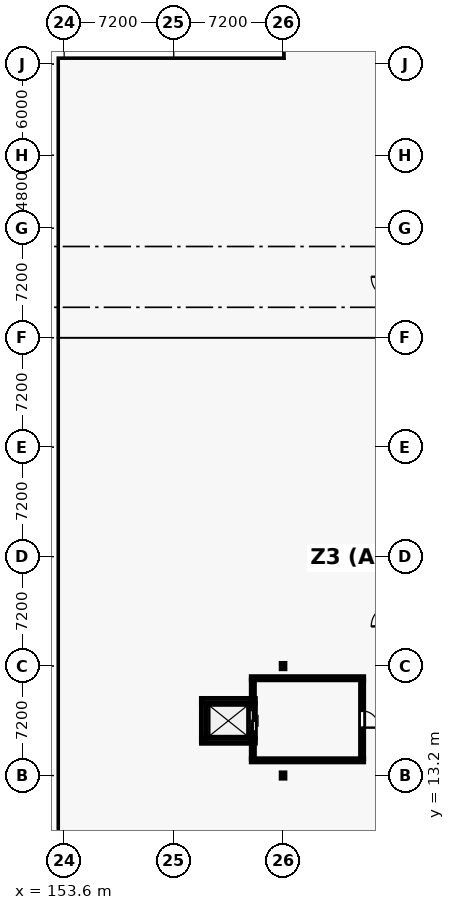
"""IFC4 building model, lengths in metres.
Left out: names, types, materials, properties, quantities, classifications, styles, units other than length and angle.
Written with IfcOpenShell. Run it as: python <this file> out.ifc"""

import sys

from ifc_helpers import new_model, si_unit, direction, frame, frame_2d, origin, origin_2d, place, context, subcontext, project, spatial, rectangle, i_section, extrude, element, fill, save


model = new_model("IFC4")
c1 = context("Model", 3, precision=1e-05, world=origin(), true_north=direction((0.0, 1.0)))
c2 = subcontext(c1, "Body", "Model", "MODEL_VIEW")
j1 = project(units=[si_unit("LENGTHUNIT", "METRE"), si_unit("PLANEANGLEUNIT", "RADIAN")], contexts=[c1])
p1 = place(None, origin())
s1 = spatial("IfcSite", under=j1, at=p1, CompositionType="ELEMENT")
p2 = place(p1, origin())
s2 = spatial("IfcBuilding", under=s1, at=p2, CompositionType="ELEMENT")
p3 = place(p2, frame((0.0, 0.0, 13.2)))
s3 = spatial("IfcBuildingStorey", under=s2, at=p3, CompositionType="ELEMENT", Elevation=13.2)
for number, where, z_axis, x_axis in (
    (1, (168.0, 13.2, 0.0), (0.0, 0.0, 1.0), (1.0, 0.0, 0.0)),
    (2, (168.0, 20.4, 0.0), (0.0, 0.0, 1.0), (1.0, 0.0, 0.0)),
):
    element("IfcColumn", number, at=place(p3, frame(where, z_axis=z_axis, x_axis=x_axis)), inside=s3, PredefinedType="COLUMN", context=c2, shape_type="SweptSolid", body=[
        extrude(i_section(OverallWidth=0.254, OverallDepth=0.356, WebThickness=0.01, FlangeThickness=0.018, FilletRadius=0.015, at=origin_2d()), origin(), (0.0, 0.0, 1.0), 3.66),
    ])
for number, where, z_axis, x_axis in (
    (3, (166.175, 15.488, 0.0), (0.0, 0.0, 1.0), (-1.0, 0.0, 0.0)),
    (4, (162.625, 18.112, 0.0), (0.0, 0.0, 1.0), (1.0, 0.0, 0.0)),
):
    element("IfcWall", number, at=place(p3, frame(where, z_axis=z_axis, x_axis=x_axis)), inside=s3, PredefinedType="SHEAR", context=c2, shape_type="SweptSolid", body=[
        extrude(rectangle(XDim=3.55, YDim=0.325, at=frame_2d((1.775, 0.0))), origin(), (0.0, 0.0, 1.0), 3.4),
    ])
p4 = place(p3, frame((162.788, 15.65, 0.0), z_axis=(0.0, 0.0, 1.0), x_axis=(0.0, 1.0, 0.0)))
e5 = element("IfcWall", 5, at=p4, inside=s3, PredefinedType="SHEAR", context=c2, shape_type="SweptSolid", body=[
    extrude(rectangle(XDim=2.3, YDim=0.325, at=frame_2d((1.15, 0.0))), origin(), (0.0, 0.0, 1.0), 3.4),
])
p5 = place(p3, frame((166.012, 17.95, 0.0), z_axis=(0.0, 0.0, 1.0), x_axis=(0.0, -1.0, 0.0)))
e6 = element("IfcWall", 6, at=p5, inside=s3, PredefinedType="SHEAR", context=c2, shape_type="SweptSolid", body=[
    extrude(rectangle(XDim=2.3, YDim=0.325, at=frame_2d((1.15, 0.0))), origin(), (0.0, 0.0, 1.0), 3.4),
])
p6 = place(p5, frame((0.45, 0.0, 0.0)))
e7 = element("IfcOpeningElement", 7, at=p6, cuts=e6, PredefinedType="OPENING", context=c2, shape_type="SweptSolid", body=[
    extrude(rectangle(XDim=1.4, YDim=2.3, at=frame_2d((0.7, 1.15))), frame((0.0, 0.172, 0.0), z_axis=(0.0, -1.0, 0.0), x_axis=(1.0, 0.0, 0.0)), (0.0, 0.0, 1.0), 0.345),
])
for number, where, z_axis, x_axis in (
    (8, (173.306, 14.2, 0.0), (0.0, 0.0, 1.0), (-1.0, 0.0, 0.0)),
    (9, (165.906, 19.6, 0.0), (0.0, 0.0, 1.0), (1.0, 0.0, 0.0)),
):
    element("IfcWall", number, at=place(p3, frame(where, z_axis=z_axis, x_axis=x_axis)), inside=s3, PredefinedType="PARTITIONING", context=c2, shape_type="SweptSolid", body=[
        extrude(rectangle(XDim=7.4, YDim=0.212, at=frame_2d((3.7, 0.0))), origin(), (0.0, 0.0, 1.0), 3.13),
    ])
p7 = place(p3, frame((166.012, 14.308, 0.0), z_axis=(0.0, 0.0, 1.0), x_axis=(0.0, 1.0, 0.0)))
e10 = element("IfcWall", 10, at=p7, inside=s3, PredefinedType="PARTITIONING", context=c2, shape_type="SweptSolid", body=[
    extrude(rectangle(XDim=1.015, YDim=0.212, at=frame_2d((0.507, 0.0))), origin(), (0.0, 0.0, 1.0), 3.13),
])
p8 = place(p3, frame((166.012, 18.277, 0.0), z_axis=(0.0, 0.0, 1.0), x_axis=(0.0, 1.0, 0.0)))
e11 = element("IfcWall", 11, at=p8, inside=s3, PredefinedType="PARTITIONING", context=c2, shape_type="SweptSolid", body=[
    extrude(rectangle(XDim=1.215, YDim=0.212, at=frame_2d((0.607, 0.0))), origin(), (0.0, 0.0, 1.0), 3.13),
])
p9 = place(p3, frame((173.2, 19.492, 0.0), z_axis=(0.0, 0.0, 1.0), x_axis=(0.0, -1.0, 0.0)))
e12 = element("IfcWall", 12, at=p9, inside=s3, PredefinedType="PARTITIONING", context=c2, shape_type="SweptSolid", body=[
    extrude(rectangle(XDim=5.184, YDim=0.212, at=frame_2d((2.592, 0.0))), origin(), (0.0, 0.0, 1.0), 3.13),
])
p10 = place(p9, frame((2.042, 0.0, 0.0)))
e13 = element("IfcOpeningElement", 13, at=p10, cuts=e12, PredefinedType="OPENING", context=c2, shape_type="SweptSolid", body=[
    extrude(rectangle(XDim=1.1, YDim=2.1, at=frame_2d((0.55, 1.05))), frame((0.0, 0.116, 0.0), z_axis=(0.0, -1.0, 0.0), x_axis=(1.0, 0.0, 0.0)), (0.0, 0.0, 1.0), 0.232),
])
p11 = place(p6, origin())
e14 = element("IfcDoor", 14, at=p11, inside=s3, OperationType="DOUBLE_DOOR_SLIDING", PredefinedType="DOOR", context=c2, shape_type="SweptSolid", body=[
    extrude(rectangle(XDim=1.4, YDim=2.3, at=frame_2d((0.7, 1.15))), frame((0.0, 0.025, 0.0), z_axis=(0.0, -1.0, 0.0), x_axis=(1.0, 0.0, 0.0)), (0.0, 0.0, 1.0), 0.05),
])
fill(e7, e14)
p12 = place(p10, origin())
e15 = element("IfcDoor", 15, at=p12, inside=s3, OperationType="SINGLE_SWING_RIGHT", PredefinedType="DOOR", context=c2, shape_type="SweptSolid", body=[
    extrude(rectangle(XDim=1.1, YDim=2.1, at=frame_2d((0.55, 1.05))), frame((0.0, 0.025, 0.0), z_axis=(0.0, -1.0, 0.0), x_axis=(1.0, 0.0, 0.0)), (0.0, 0.0, 1.0), 0.05),
])
fill(e13, e15)
save(model, sys.argv[1])
